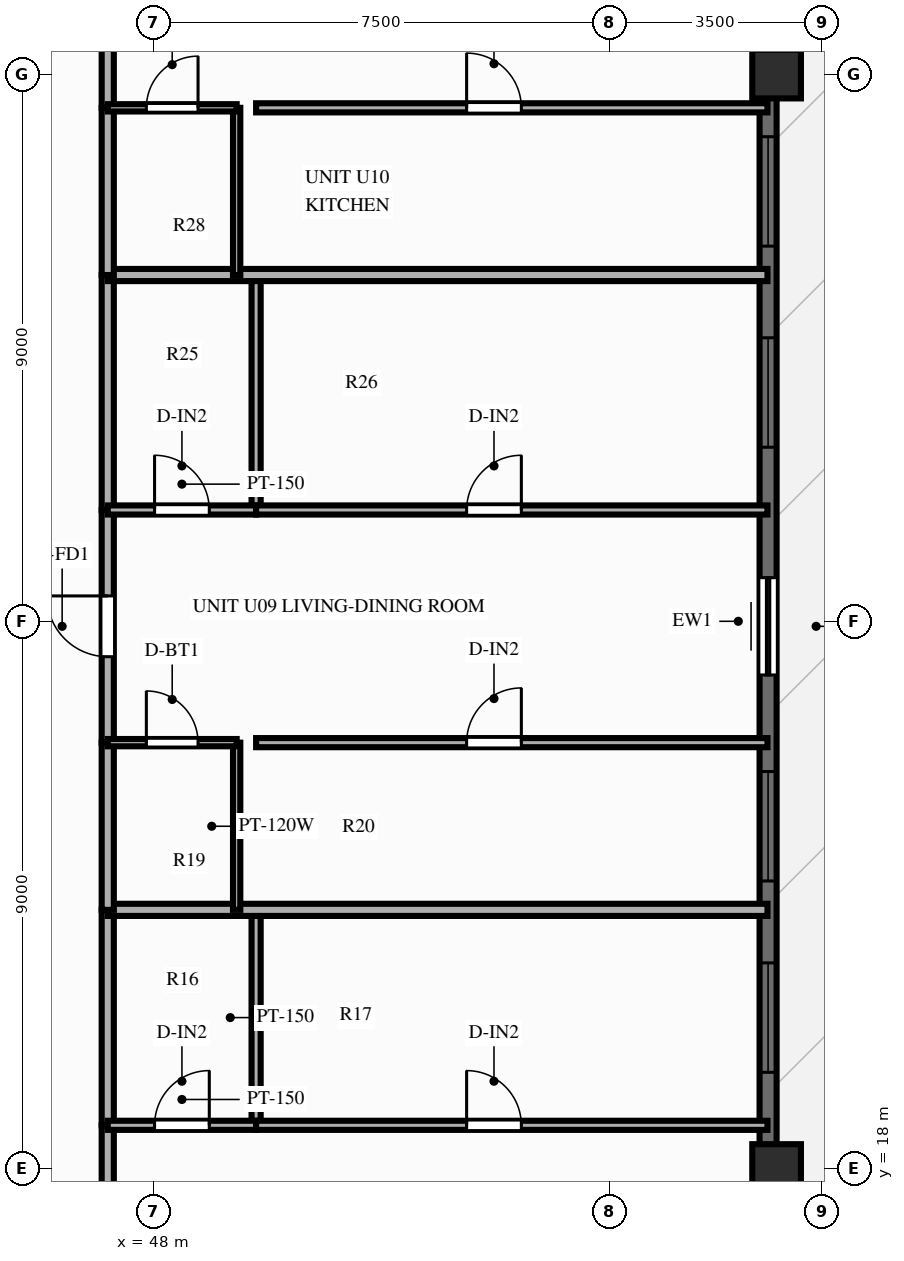
"""IFC4 building model, lengths in metres.
Left out: names, types, materials, properties, quantities, classifications, styles, units other than length and angle.
Written with IfcOpenShell. Run it as: python <this file> out.ifc"""

import sys

from ifc_helpers import new_model, si_unit, direction, frame, frame_2d, origin, origin_2d, place, context, subcontext, project, spatial, rectangle, extrude, source, transform, mapped, element, fill, save


model = new_model("IFC4")
c1 = context("Model", 3, precision=1e-05, world=origin(), true_north=direction((0.0, 1.0)))
c2 = subcontext(c1, "Body", "Model", "MODEL_VIEW")
j1 = project(units=[si_unit("LENGTHUNIT", "METRE"), si_unit("PLANEANGLEUNIT", "RADIAN")], contexts=[c1])
p1 = place(None, origin())
s1 = spatial("IfcSite", under=j1, at=p1, CompositionType="ELEMENT")
p2 = place(p1, origin())
s2 = spatial("IfcBuilding", under=s1, at=p2, CompositionType="ELEMENT")
p3 = place(p2, frame((0.0, 0.0, 182.8)))
s3 = spatial("IfcBuildingStorey", under=s2, at=p3, CompositionType="ELEMENT", Elevation=182.8)
m1 = source(origin(), c2, "Body", "SweptSolid", [
    extrude(rectangle(XDim=0.8, YDim=0.8, at=origin_2d()), origin(), (0.0, 0.0, 1.0), 3.9),
])
for number, where, z_axis, x_axis in (
    (1, (58.25, 18.0, 0.0), (0.0, 0.0, 1.0), (1.0, 0.0, 0.0)),
    (2, (58.25, 36.0, 0.0), (0.0, 0.0, 1.0), (1.0, 0.0, 0.0)),
):
    element("IfcColumn", number, at=place(p3, frame(where, z_axis=z_axis, x_axis=x_axis)), inside=s3, PredefinedType="COLUMN", context=c2, shape_type="MappedRepresentation", body=[
        mapped(m1, transform((0.0, 0.0, 0.0), scale=1.0)),
    ])
p4 = place(p3, frame((58.11, 11.0, 0.0), z_axis=(0.0, 0.0, 1.0), x_axis=(0.0, 1.0, 0.0)))
e3 = element("IfcWall", 3, at=p4, inside=s3, PredefinedType="SOLIDWALL", context=c2, shape_type="SweptSolid", body=[
    extrude(rectangle(XDim=32.0, YDim=0.28, at=frame_2d((16.0, 0.0))), origin(), (0.0, 0.0, 1.0), 2.79),
])
p5 = place(p4, frame((0.75, 0.0, 0.85)))
e4 = element("IfcOpeningElement", 4, at=p5, cuts=e3, PredefinedType="OPENING", context=c2, shape_type="SweptSolid", body=[
    extrude(rectangle(XDim=1.8, YDim=1.65, at=frame_2d((0.9, 0.825))), frame((0.0, 0.152, 0.0), z_axis=(0.0, -1.0, 0.0), x_axis=(1.0, 0.0, 0.0)), (0.0, 0.0, 1.0), 0.304),
])
p6 = place(p4, frame((4.01, 0.0, 0.85)))
e5 = element("IfcOpeningElement", 5, at=p6, cuts=e3, PredefinedType="OPENING", context=c2, shape_type="SweptSolid", body=[
    extrude(rectangle(XDim=1.8, YDim=1.65, at=frame_2d((0.9, 0.825))), frame((0.0, 0.152, 0.0), z_axis=(0.0, -1.0, 0.0), x_axis=(1.0, 0.0, 0.0)), (0.0, 0.0, 1.0), 0.304),
])
p7 = place(p4, frame((8.582, 0.0, 0.85)))
e6 = element("IfcOpeningElement", 6, at=p7, cuts=e3, PredefinedType="OPENING", context=c2, shape_type="SweptSolid", body=[
    extrude(rectangle(XDim=1.8, YDim=1.65, at=frame_2d((0.9, 0.825))), frame((0.0, 0.152, 0.0), z_axis=(0.0, -1.0, 0.0), x_axis=(1.0, 0.0, 0.0)), (0.0, 0.0, 1.0), 0.304),
])
p8 = place(p4, frame((11.729, 0.0, 0.85)))
e7 = element("IfcOpeningElement", 7, at=p8, cuts=e3, PredefinedType="OPENING", context=c2, shape_type="SweptSolid", body=[
    extrude(rectangle(XDim=1.8, YDim=1.65, at=frame_2d((0.9, 0.825))), frame((0.0, 0.152, 0.0), z_axis=(0.0, -1.0, 0.0), x_axis=(1.0, 0.0, 0.0)), (0.0, 0.0, 1.0), 0.304),
])
p9 = place(p4, frame((16.718, 0.0, 0.0), z_axis=(0.0, 0.0, 1.0), x_axis=(-1.0, 0.0, 0.0)))
e8 = element("IfcOpeningElement", 8, at=p9, cuts=e3, PredefinedType="OPENING", context=c2, shape_type="SweptSolid", body=[
    extrude(rectangle(XDim=1.6, YDim=2.15, at=frame_2d((0.8, 1.075))), frame((0.0, 0.152, 0.0), z_axis=(0.0, -1.0, 0.0), x_axis=(1.0, 0.0, 0.0)), (0.0, 0.0, 1.0), 0.304),
])
p10 = place(p4, frame((18.863, 0.0, 0.85)))
e9 = element("IfcOpeningElement", 9, at=p10, cuts=e3, PredefinedType="OPENING", context=c2, shape_type="SweptSolid", body=[
    extrude(rectangle(XDim=1.8, YDim=1.65, at=frame_2d((0.9, 0.825))), frame((0.0, 0.152, 0.0), z_axis=(0.0, -1.0, 0.0), x_axis=(1.0, 0.0, 0.0)), (0.0, 0.0, 1.0), 0.304),
])
p11 = place(p4, frame((22.17, 0.0, 0.85)))
e10 = element("IfcOpeningElement", 10, at=p11, cuts=e3, PredefinedType="OPENING", context=c2, shape_type="SweptSolid", body=[
    extrude(rectangle(XDim=1.8, YDim=1.65, at=frame_2d((0.9, 0.825))), frame((0.0, 0.152, 0.0), z_axis=(0.0, -1.0, 0.0), x_axis=(1.0, 0.0, 0.0)), (0.0, 0.0, 1.0), 0.304),
])
p12 = place(p4, frame((25.706, 0.0, 0.85)))
e11 = element("IfcOpeningElement", 11, at=p12, cuts=e3, PredefinedType="OPENING", context=c2, shape_type="SweptSolid", body=[
    extrude(rectangle(XDim=1.8, YDim=1.65, at=frame_2d((0.9, 0.825))), frame((0.0, 0.152, 0.0), z_axis=(0.0, -1.0, 0.0), x_axis=(1.0, 0.0, 0.0)), (0.0, 0.0, 1.0), 0.304),
])
p13 = place(p4, frame((28.966, 0.0, 0.85)))
e12 = element("IfcOpeningElement", 12, at=p13, cuts=e3, PredefinedType="OPENING", context=c2, shape_type="SweptSolid", body=[
    extrude(rectangle(XDim=1.8, YDim=1.65, at=frame_2d((0.9, 0.825))), frame((0.0, 0.152, 0.0), z_axis=(0.0, -1.0, 0.0), x_axis=(1.0, 0.0, 0.0)), (0.0, 0.0, 1.0), 0.304),
])
p14 = place(p3, frame((47.25, 14.059, 0.0), z_axis=(0.0, 0.0, 1.0), x_axis=(0.0, 1.0, 0.0)))
e13 = element("IfcWall", 13, at=p14, inside=s3, PredefinedType="PARTITIONING", context=c2, shape_type="SweptSolid", body=[
    extrude(rectangle(XDim=4.651, YDim=0.2, at=frame_2d((2.326, 0.0))), origin(), (0.0, 0.0, 1.0), 3.69),
])
p15 = place(p14, frame((1.76, 0.0, 0.0)))
e14 = element("IfcOpeningElement", 14, at=p15, cuts=e13, PredefinedType="OPENING", context=c2, shape_type="SweptSolid", body=[
    extrude(rectangle(XDim=1.0, YDim=2.15, at=frame_2d((0.5, 1.075))), frame((0.0, 0.112, 0.0), z_axis=(0.0, -1.0, 0.0), x_axis=(1.0, 0.0, 0.0)), (0.0, 0.0, 1.0), 0.224),
])
p16 = place(p3, frame((47.25, 18.71, 0.0), z_axis=(0.0, 0.0, 1.0), x_axis=(0.0, 1.0, 0.0)))
e15 = element("IfcWall", 15, at=p16, inside=s3, PredefinedType="PARTITIONING", context=c2, shape_type="SweptSolid", body=[
    extrude(rectangle(XDim=3.544, YDim=0.2, at=frame_2d((1.772, 0.0))), origin(), (0.0, 0.0, 1.0), 3.69),
])
p17 = place(p3, frame((49.69, 18.71, 0.0), z_axis=(0.0, 0.0, 1.0), x_axis=(0.0, 1.0, 0.0)))
e16 = element("IfcWall", 16, at=p17, inside=s3, PredefinedType="PARTITIONING", context=c2, shape_type="SweptSolid", body=[
    extrude(rectangle(XDim=3.544, YDim=0.15, at=frame_2d((1.772, 0.0))), origin(), (0.0, 0.0, 1.0), 3.69),
])
p18 = place(p3, frame((47.25, 18.71, 0.0), z_axis=(0.0, 0.0, 1.0), x_axis=(1.0, 0.0, 0.0)))
e17 = element("IfcWall", 17, at=p18, inside=s3, PredefinedType="PARTITIONING", context=c2, shape_type="SweptSolid", body=[
    extrude(rectangle(XDim=2.44, YDim=0.15, at=frame_2d((1.22, 0.0))), origin(), (0.0, 0.0, 1.0), 3.69),
])
p19 = place(p18, frame((0.77, 0.0, 0.0)))
e18 = element("IfcOpeningElement", 18, at=p19, cuts=e17, PredefinedType="OPENING", context=c2, shape_type="SweptSolid", body=[
    extrude(rectangle(XDim=0.9, YDim=2.1, at=frame_2d((0.45, 1.05))), frame((0.0, 0.087, 0.0), z_axis=(0.0, -1.0, 0.0), x_axis=(1.0, 0.0, 0.0)), (0.0, 0.0, 1.0), 0.174),
])
p20 = place(p3, frame((49.69, 18.71, 0.0), z_axis=(0.0, 0.0, 1.0), x_axis=(1.0, 0.0, 0.0)))
e19 = element("IfcWall", 19, at=p20, inside=s3, PredefinedType="PARTITIONING", context=c2, shape_type="SweptSolid", body=[
    extrude(rectangle(XDim=8.41, YDim=0.15, at=frame_2d((4.205, 0.0))), origin(), (0.0, 0.0, 1.0), 3.69),
])
p21 = place(p20, frame((3.462, 0.0, 0.0)))
e20 = element("IfcOpeningElement", 20, at=p21, cuts=e19, PredefinedType="OPENING", context=c2, shape_type="SweptSolid", body=[
    extrude(rectangle(XDim=0.9, YDim=2.1, at=frame_2d((0.45, 1.05))), frame((0.0, 0.087, 0.0), z_axis=(0.0, -1.0, 0.0), x_axis=(1.0, 0.0, 0.0)), (0.0, 0.0, 1.0), 0.174),
])
p22 = place(p3, frame((47.25, 22.254, 0.0), z_axis=(0.0, 0.0, 1.0), x_axis=(1.0, 0.0, 0.0)))
e21 = element("IfcWall", 21, at=p22, inside=s3, PredefinedType="PARTITIONING", context=c2, shape_type="SweptSolid", body=[
    extrude(rectangle(XDim=10.85, YDim=0.2, at=frame_2d((5.425, 0.0))), origin(), (0.0, 0.0, 1.0), 3.29),
])
p23 = place(p3, frame((47.25, 22.254, 0.0), z_axis=(0.0, 0.0, 1.0), x_axis=(0.0, 1.0, 0.0)))
e22 = element("IfcWall", 22, at=p23, inside=s3, PredefinedType="PARTITIONING", context=c2, shape_type="SweptSolid", body=[
    extrude(rectangle(XDim=2.75, YDim=0.2, at=frame_2d((1.375, 0.0))), origin(), (0.0, 0.0, 1.0), 3.69),
])
p24 = place(p3, frame((47.25, 25.004, 0.0), z_axis=(0.0, 0.0, 1.0), x_axis=(0.0, 1.0, 0.0)))
e23 = element("IfcWall", 23, at=p24, inside=s3, PredefinedType="PARTITIONING", context=c2, shape_type="SweptSolid", body=[
    extrude(rectangle(XDim=3.827, YDim=0.2, at=frame_2d((1.914, 0.0))), origin(), (0.0, 0.0, 1.0), 3.69),
])
p25 = place(p24, frame((1.413, 0.0, 0.0)))
e24 = element("IfcOpeningElement", 24, at=p25, cuts=e23, PredefinedType="OPENING", context=c2, shape_type="SweptSolid", body=[
    extrude(rectangle(XDim=1.0, YDim=2.15, at=frame_2d((0.5, 1.075))), frame((0.0, 0.112, 0.0), z_axis=(0.0, -1.0, 0.0), x_axis=(1.0, 0.0, 0.0)), (0.0, 0.0, 1.0), 0.224),
])
p26 = place(p3, frame((47.25, 28.831, 0.0), z_axis=(0.0, 0.0, 1.0), x_axis=(0.0, 1.0, 0.0)))
e25 = element("IfcWall", 25, at=p26, inside=s3, PredefinedType="PARTITIONING", context=c2, shape_type="SweptSolid", body=[
    extrude(rectangle(XDim=3.865, YDim=0.2, at=frame_2d((1.932, 0.0))), origin(), (0.0, 0.0, 1.0), 3.69),
])
p27 = place(p3, frame((49.37, 22.254, 0.0), z_axis=(0.0, 0.0, 1.0), x_axis=(0.0, 1.0, 0.0)))
e26 = element("IfcWall", 26, at=p27, inside=s3, PredefinedType="PARTITIONING", context=c2, shape_type="SweptSolid", body=[
    extrude(rectangle(XDim=2.75, YDim=0.12, at=frame_2d((1.375, 0.0))), origin(), (0.0, 0.0, 1.0), 3.69),
])
p28 = place(p3, frame((49.69, 28.831, 0.0), z_axis=(0.0, 0.0, 1.0), x_axis=(0.0, 1.0, 0.0)))
e27 = element("IfcWall", 27, at=p28, inside=s3, PredefinedType="PARTITIONING", context=c2, shape_type="SweptSolid", body=[
    extrude(rectangle(XDim=3.865, YDim=0.15, at=frame_2d((1.932, 0.0))), origin(), (0.0, 0.0, 1.0), 3.69),
])
p29 = place(p3, frame((47.25, 25.004, 0.0), z_axis=(0.0, 0.0, 1.0), x_axis=(1.0, 0.0, 0.0)))
e28 = element("IfcWall", 28, at=p29, inside=s3, PredefinedType="PARTITIONING", context=c2, shape_type="SweptSolid", body=[
    extrude(rectangle(XDim=2.12, YDim=0.12, at=frame_2d((1.06, 0.0))), origin(), (0.0, 0.0, 1.0), 3.69),
])
p30 = place(p29, frame((0.635, 0.0, 0.0)))
e29 = element("IfcOpeningElement", 29, at=p30, cuts=e28, PredefinedType="OPENING", context=c2, shape_type="SweptSolid", body=[
    extrude(rectangle(XDim=0.85, YDim=2.05, at=frame_2d((0.425, 1.025))), frame((0.0, 0.072, 0.0), z_axis=(0.0, -1.0, 0.0), x_axis=(1.0, 0.0, 0.0)), (0.0, 0.0, 1.0), 0.144),
])
p31 = place(p3, frame((49.69, 25.004, 0.0), z_axis=(0.0, 0.0, 1.0), x_axis=(1.0, 0.0, 0.0)))
e30 = element("IfcWall", 30, at=p31, inside=s3, PredefinedType="PARTITIONING", context=c2, shape_type="SweptSolid", body=[
    extrude(rectangle(XDim=8.41, YDim=0.15, at=frame_2d((4.205, 0.0))), origin(), (0.0, 0.0, 1.0), 3.69),
])
p32 = place(p31, frame((3.462, 0.0, 0.0)))
e31 = element("IfcOpeningElement", 31, at=p32, cuts=e30, PredefinedType="OPENING", context=c2, shape_type="SweptSolid", body=[
    extrude(rectangle(XDim=0.9, YDim=2.1, at=frame_2d((0.45, 1.05))), frame((0.0, 0.087, 0.0), z_axis=(0.0, -1.0, 0.0), x_axis=(1.0, 0.0, 0.0)), (0.0, 0.0, 1.0), 0.174),
])
p33 = place(p3, frame((47.25, 28.831, 0.0), z_axis=(0.0, 0.0, 1.0), x_axis=(1.0, 0.0, 0.0)))
e32 = element("IfcWall", 32, at=p33, inside=s3, PredefinedType="PARTITIONING", context=c2, shape_type="SweptSolid", body=[
    extrude(rectangle(XDim=2.44, YDim=0.15, at=frame_2d((1.22, 0.0))), origin(), (0.0, 0.0, 1.0), 3.69),
])
p34 = place(p33, frame((0.77, 0.0, 0.0)))
e33 = element("IfcOpeningElement", 33, at=p34, cuts=e32, PredefinedType="OPENING", context=c2, shape_type="SweptSolid", body=[
    extrude(rectangle(XDim=0.9, YDim=2.1, at=frame_2d((0.45, 1.05))), frame((0.0, 0.087, 0.0), z_axis=(0.0, -1.0, 0.0), x_axis=(1.0, 0.0, 0.0)), (0.0, 0.0, 1.0), 0.174),
])
p35 = place(p3, frame((49.69, 28.831, 0.0), z_axis=(0.0, 0.0, 1.0), x_axis=(1.0, 0.0, 0.0)))
e34 = element("IfcWall", 34, at=p35, inside=s3, PredefinedType="PARTITIONING", context=c2, shape_type="SweptSolid", body=[
    extrude(rectangle(XDim=8.41, YDim=0.15, at=frame_2d((4.205, 0.0))), origin(), (0.0, 0.0, 1.0), 3.69),
])
p36 = place(p35, frame((3.462, 0.0, 0.0)))
e35 = element("IfcOpeningElement", 35, at=p36, cuts=e34, PredefinedType="OPENING", context=c2, shape_type="SweptSolid", body=[
    extrude(rectangle(XDim=0.9, YDim=2.1, at=frame_2d((0.45, 1.05))), frame((0.0, 0.087, 0.0), z_axis=(0.0, -1.0, 0.0), x_axis=(1.0, 0.0, 0.0)), (0.0, 0.0, 1.0), 0.174),
])
p37 = place(p3, frame((47.25, 32.695, 0.0), z_axis=(0.0, 0.0, 1.0), x_axis=(1.0, 0.0, 0.0)))
e36 = element("IfcWall", 36, at=p37, inside=s3, PredefinedType="PARTITIONING", context=c2, shape_type="SweptSolid", body=[
    extrude(rectangle(XDim=10.85, YDim=0.2, at=frame_2d((5.425, 0.0))), origin(), (0.0, 0.0, 1.0), 3.69),
])
p38 = place(p3, frame((47.25, 32.695, 0.0), z_axis=(0.0, 0.0, 1.0), x_axis=(0.0, 1.0, 0.0)))
e37 = element("IfcWall", 37, at=p38, inside=s3, PredefinedType="PARTITIONING", context=c2, shape_type="SweptSolid", body=[
    extrude(rectangle(XDim=2.75, YDim=0.2, at=frame_2d((1.375, 0.0))), origin(), (0.0, 0.0, 1.0), 3.69),
])
p39 = place(p3, frame((47.25, 35.445, 0.0), z_axis=(0.0, 0.0, 1.0), x_axis=(0.0, 1.0, 0.0)))
e38 = element("IfcWall", 38, at=p39, inside=s3, PredefinedType="PARTITIONING", context=c2, shape_type="SweptSolid", body=[
    extrude(rectangle(XDim=3.527, YDim=0.2, at=frame_2d((1.764, 0.0))), origin(), (0.0, 0.0, 1.0), 3.69),
])
p40 = place(p39, frame((1.724, 0.0, 0.0)))
e39 = element("IfcOpeningElement", 39, at=p40, cuts=e38, PredefinedType="OPENING", context=c2, shape_type="SweptSolid", body=[
    extrude(rectangle(XDim=1.0, YDim=2.15, at=frame_2d((0.5, 1.075))), frame((0.0, 0.112, 0.0), z_axis=(0.0, -1.0, 0.0), x_axis=(1.0, 0.0, 0.0)), (0.0, 0.0, 1.0), 0.224),
])
p41 = place(p3, frame((49.37, 32.695, 0.0), z_axis=(0.0, 0.0, 1.0), x_axis=(0.0, 1.0, 0.0)))
e40 = element("IfcWall", 40, at=p41, inside=s3, PredefinedType="PARTITIONING", context=c2, shape_type="SweptSolid", body=[
    extrude(rectangle(XDim=2.75, YDim=0.12, at=frame_2d((1.375, 0.0))), origin(), (0.0, 0.0, 1.0), 3.69),
])
p42 = place(p3, frame((47.25, 35.445, 0.0), z_axis=(0.0, 0.0, 1.0), x_axis=(1.0, 0.0, 0.0)))
e41 = element("IfcWall", 41, at=p42, inside=s3, PredefinedType="PARTITIONING", context=c2, shape_type="SweptSolid", body=[
    extrude(rectangle(XDim=2.12, YDim=0.12, at=frame_2d((1.06, 0.0))), origin(), (0.0, 0.0, 1.0), 3.69),
])
p43 = place(p42, frame((0.635, 0.0, 0.0)))
e42 = element("IfcOpeningElement", 42, at=p43, cuts=e41, PredefinedType="OPENING", context=c2, shape_type="SweptSolid", body=[
    extrude(rectangle(XDim=0.85, YDim=2.05, at=frame_2d((0.425, 1.025))), frame((0.0, 0.072, 0.0), z_axis=(0.0, -1.0, 0.0), x_axis=(1.0, 0.0, 0.0)), (0.0, 0.0, 1.0), 0.144),
])
p44 = place(p3, frame((49.69, 35.445, 0.0), z_axis=(0.0, 0.0, 1.0), x_axis=(1.0, 0.0, 0.0)))
e43 = element("IfcWall", 43, at=p44, inside=s3, PredefinedType="PARTITIONING", context=c2, shape_type="SweptSolid", body=[
    extrude(rectangle(XDim=8.41, YDim=0.15, at=frame_2d((4.205, 0.0))), origin(), (0.0, 0.0, 1.0), 3.69),
])
p45 = place(p44, frame((3.462, 0.0, 0.0)))
e44 = element("IfcOpeningElement", 44, at=p45, cuts=e43, PredefinedType="OPENING", context=c2, shape_type="SweptSolid", body=[
    extrude(rectangle(XDim=0.9, YDim=2.1, at=frame_2d((0.45, 1.05))), frame((0.0, 0.087, 0.0), z_axis=(0.0, -1.0, 0.0), x_axis=(1.0, 0.0, 0.0)), (0.0, 0.0, 1.0), 0.174),
])
m2 = source(origin(), c2, "Body", "SweptSolid", [
    extrude(rectangle(XDim=1.8, YDim=1.65, at=frame_2d((0.9, 0.825))), frame((0.0, 0.03, 0.0), z_axis=(0.0, -1.0, 0.0), x_axis=(1.0, 0.0, 0.0)), (0.0, 0.0, 1.0), 0.06),
])
p46 = place(p7, origin())
e45 = element("IfcWindow", 45, at=p46, inside=s3, PartitioningType="SINGLE_PANEL", PredefinedType="WINDOW", context=c2, shape_type="MappedRepresentation", body=[
    mapped(m2, transform((0.0, 0.0, 0.0), scale=1.0)),
])
fill(e6, e45)
p47 = place(p8, origin())
e46 = element("IfcWindow", 46, at=p47, inside=s3, PartitioningType="SINGLE_PANEL", PredefinedType="WINDOW", context=c2, shape_type="MappedRepresentation", body=[
    mapped(m2, transform((0.0, 0.0, 0.0), scale=1.0)),
])
fill(e7, e46)
m3 = source(origin(), c2, "Body", "SweptSolid", [
    extrude(rectangle(XDim=1.6, YDim=2.15, at=frame_2d((0.8, 1.075))), frame((0.0, 0.025, 0.0), z_axis=(0.0, -1.0, 0.0), x_axis=(1.0, 0.0, 0.0)), (0.0, 0.0, 1.0), 0.05),
])
p48 = place(p9, origin())
e47 = element("IfcDoor", 47, at=p48, inside=s3, OperationType="SLIDING_TO_LEFT", PredefinedType="DOOR", context=c2, shape_type="MappedRepresentation", body=[
    mapped(m3, transform((0.0, 0.0, 0.0), scale=1.0)),
])
fill(e8, e47)
p49 = place(p10, origin())
e48 = element("IfcWindow", 48, at=p49, inside=s3, PartitioningType="SINGLE_PANEL", PredefinedType="WINDOW", context=c2, shape_type="MappedRepresentation", body=[
    mapped(m2, transform((0.0, 0.0, 0.0), scale=1.0)),
])
fill(e9, e48)
p50 = place(p11, origin())
e49 = element("IfcWindow", 49, at=p50, inside=s3, PartitioningType="SINGLE_PANEL", PredefinedType="WINDOW", context=c2, shape_type="MappedRepresentation", body=[
    mapped(m2, transform((0.0, 0.0, 0.0), scale=1.0)),
])
fill(e10, e49)
m4 = source(origin(), c2, "Body", "SweptSolid", [
    extrude(rectangle(XDim=0.9, YDim=2.1, at=frame_2d((0.45, 1.05))), frame((0.0, 0.025, 0.0), z_axis=(0.0, -1.0, 0.0), x_axis=(1.0, 0.0, 0.0)), (0.0, 0.0, 1.0), 0.05),
])
p51 = place(p19, origin())
e50 = element("IfcDoor", 50, at=p51, inside=s3, OperationType="SINGLE_SWING_RIGHT", PredefinedType="DOOR", context=c2, shape_type="MappedRepresentation", body=[
    mapped(m4, transform((0.0, 0.0, 0.0), scale=1.0)),
])
fill(e18, e50)
p52 = place(p21, origin())
e51 = element("IfcDoor", 51, at=p52, inside=s3, OperationType="SINGLE_SWING_LEFT", PredefinedType="DOOR", context=c2, shape_type="MappedRepresentation", body=[
    mapped(m4, transform((0.0, 0.0, 0.0), scale=1.0)),
])
fill(e20, e51)
m5 = source(origin(), c2, "Body", "SweptSolid", [
    extrude(rectangle(XDim=1.0, YDim=2.15, at=frame_2d((0.5, 1.075))), frame((0.0, 0.025, 0.0), z_axis=(0.0, -1.0, 0.0), x_axis=(1.0, 0.0, 0.0)), (0.0, 0.0, 1.0), 0.05),
])
p53 = place(p25, origin())
e52 = element("IfcDoor", 52, at=p53, inside=s3, OperationType="SINGLE_SWING_RIGHT", PredefinedType="DOOR", context=c2, shape_type="MappedRepresentation", body=[
    mapped(m5, transform((0.0, 0.0, 0.0), scale=1.0)),
])
fill(e24, e52)
m6 = source(origin(), c2, "Body", "SweptSolid", [
    extrude(rectangle(XDim=0.85, YDim=2.05, at=frame_2d((0.425, 1.025))), frame((0.0, 0.025, 0.0), z_axis=(0.0, -1.0, 0.0), x_axis=(1.0, 0.0, 0.0)), (0.0, 0.0, 1.0), 0.05),
])
p54 = place(p30, origin())
e53 = element("IfcDoor", 53, at=p54, inside=s3, OperationType="SINGLE_SWING_LEFT", PredefinedType="DOOR", context=c2, shape_type="MappedRepresentation", body=[
    mapped(m6, transform((0.0, 0.0, 0.0), scale=1.0)),
])
fill(e29, e53)
p55 = place(p32, origin())
e54 = element("IfcDoor", 54, at=p55, inside=s3, OperationType="SINGLE_SWING_RIGHT", PredefinedType="DOOR", context=c2, shape_type="MappedRepresentation", body=[
    mapped(m4, transform((0.0, 0.0, 0.0), scale=1.0)),
])
fill(e31, e54)
p56 = place(p34, origin())
e55 = element("IfcDoor", 55, at=p56, inside=s3, OperationType="SINGLE_SWING_LEFT", PredefinedType="DOOR", context=c2, shape_type="MappedRepresentation", body=[
    mapped(m4, transform((0.0, 0.0, 0.0), scale=1.0)),
])
fill(e33, e55)
p57 = place(p36, origin())
e56 = element("IfcDoor", 56, at=p57, inside=s3, OperationType="SINGLE_SWING_RIGHT", PredefinedType="DOOR", context=c2, shape_type="MappedRepresentation", body=[
    mapped(m4, transform((0.0, 0.0, 0.0), scale=1.0)),
])
fill(e35, e56)
p58 = place(p43, origin())
e57 = element("IfcDoor", 57, at=p58, inside=s3, OperationType="SINGLE_SWING_RIGHT", PredefinedType="DOOR", context=c2, shape_type="MappedRepresentation", body=[
    mapped(m6, transform((0.0, 0.0, 0.0), scale=1.0)),
])
fill(e42, e57)
p59 = place(p45, origin())
e58 = element("IfcDoor", 58, at=p59, inside=s3, OperationType="SINGLE_SWING_LEFT", PredefinedType="DOOR", context=c2, shape_type="MappedRepresentation", body=[
    mapped(m4, transform((0.0, 0.0, 0.0), scale=1.0)),
])
fill(e44, e58)
save(model, sys.argv[1])
